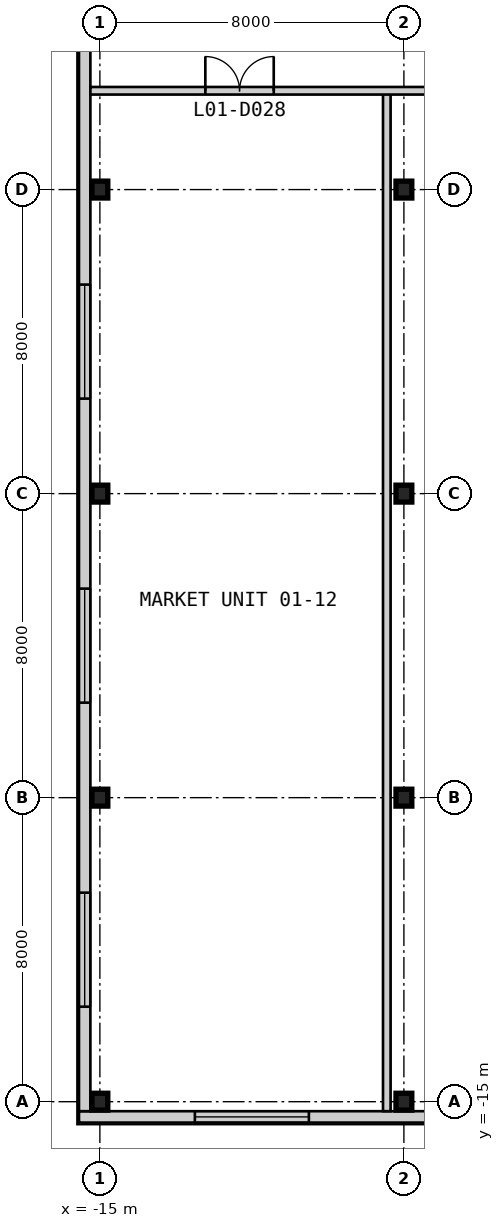
"""IFC4 building model, lengths in metres.
Left out: names, types, materials, properties, quantities, classifications, styles, units other than length and angle.
Written with IfcOpenShell. Run it as: python <this file> out.ifc"""

import sys

from ifc_helpers import new_model, si_unit, direction, frame, frame_2d, origin, origin_2d, place, context, subcontext, project, spatial, rectangle, i_section, extrude, element, fill, save


model = new_model("IFC4")
c1 = context("Model", 3, precision=1e-05, world=origin(), true_north=direction((0.0, 1.0)))
c2 = subcontext(c1, "Body", "Model", "MODEL_VIEW")
j1 = project(units=[si_unit("LENGTHUNIT", "METRE"), si_unit("PLANEANGLEUNIT", "RADIAN")], contexts=[c1])
p1 = place(None, origin())
s1 = spatial("IfcSite", under=j1, at=p1, CompositionType="ELEMENT")
p2 = place(p1, origin())
s2 = spatial("IfcBuilding", under=s1, at=p2, CompositionType="ELEMENT")
p3 = place(p2, frame((0.0, 0.0, 7.0)))
s3 = spatial("IfcBuildingStorey", under=s2, at=p3, CompositionType="ELEMENT", Elevation=7.0)
for number, where, z_axis, x_axis in (
    (1, (-15.0, -15.0, 0.0), (0.0, 0.0, 1.0), (1.0, 0.0, 0.0)),
    (2, (-15.0, -7.0, 0.0), (0.0, 0.0, 1.0), (1.0, 0.0, 0.0)),
    (3, (-15.0, 1.0, 0.0), (0.0, 0.0, 1.0), (1.0, 0.0, 0.0)),
    (4, (-15.0, 9.0, 0.0), (0.0, 0.0, 1.0), (1.0, 0.0, 0.0)),
    (5, (-7.0, -15.0, 0.0), (0.0, 0.0, 1.0), (1.0, 0.0, 0.0)),
    (6, (-7.0, -7.0, 0.0), (0.0, 0.0, 1.0), (1.0, 0.0, 0.0)),
    (7, (-7.0, 1.0, 0.0), (0.0, 0.0, 1.0), (1.0, 0.0, 0.0)),
    (8, (-7.0, 9.0, 0.0), (0.0, 0.0, 1.0), (1.0, 0.0, 0.0)),
):
    element("IfcColumn", number, at=place(p3, frame(where, z_axis=z_axis, x_axis=x_axis)), inside=s3, PredefinedType="COLUMN", context=c2, shape_type="SweptSolid", body=[
        extrude(i_section(OverallWidth=0.417, OverallDepth=0.445, WebThickness=0.039, FlangeThickness=0.063, at=origin_2d()), origin(), (0.0, 0.0, 1.0), 4.8),
    ])
p4 = place(p3, frame((-15.55, -15.4, 0.0), z_axis=(0.0, 0.0, 1.0), x_axis=(1.0, 0.0, 0.0)))
e9 = element("IfcWall", 9, at=p4, inside=s3, PredefinedType="SOLIDWALL", context=c2, shape_type="SweptSolid", body=[
    extrude(rectangle(XDim=81.1, YDim=0.3, at=frame_2d((40.55, 0.0))), origin(), (0.0, 0.0, 1.0), 4.5),
])
p5 = place(p4, frame((3.05, 0.0, 0.9)))
e10 = element("IfcOpeningElement", 10, at=p5, cuts=e9, PredefinedType="OPENING", context=c2, shape_type="SweptSolid", body=[
    extrude(rectangle(XDim=3.0, YDim=2.4, at=frame_2d((1.5, 1.2))), frame((0.0, 0.16, 0.0), z_axis=(0.0, -1.0, 0.0), x_axis=(1.0, 0.0, 0.0)), (0.0, 0.0, 1.0), 0.32),
])
p6 = place(p4, frame((11.05, 0.0, 0.9)))
e11 = element("IfcOpeningElement", 11, at=p6, cuts=e9, PredefinedType="OPENING", context=c2, shape_type="SweptSolid", body=[
    extrude(rectangle(XDim=3.0, YDim=2.4, at=frame_2d((1.5, 1.2))), frame((0.0, 0.16, 0.0), z_axis=(0.0, -1.0, 0.0), x_axis=(1.0, 0.0, 0.0)), (0.0, 0.0, 1.0), 0.32),
])
p7 = place(p4, frame((19.05, 0.0, 0.9)))
e12 = element("IfcOpeningElement", 12, at=p7, cuts=e9, PredefinedType="OPENING", context=c2, shape_type="SweptSolid", body=[
    extrude(rectangle(XDim=3.0, YDim=2.4, at=frame_2d((1.5, 1.2))), frame((0.0, 0.16, 0.0), z_axis=(0.0, -1.0, 0.0), x_axis=(1.0, 0.0, 0.0)), (0.0, 0.0, 1.0), 0.32),
])
p8 = place(p4, frame((33.05, 0.0, 0.9)))
e13 = element("IfcOpeningElement", 13, at=p8, cuts=e9, PredefinedType="OPENING", context=c2, shape_type="SweptSolid", body=[
    extrude(rectangle(XDim=3.0, YDim=2.4, at=frame_2d((1.5, 1.2))), frame((0.0, 0.16, 0.0), z_axis=(0.0, -1.0, 0.0), x_axis=(1.0, 0.0, 0.0)), (0.0, 0.0, 1.0), 0.32),
])
p9 = place(p4, frame((45.05, 0.0, 0.9)))
e14 = element("IfcOpeningElement", 14, at=p9, cuts=e9, PredefinedType="OPENING", context=c2, shape_type="SweptSolid", body=[
    extrude(rectangle(XDim=3.0, YDim=2.4, at=frame_2d((1.5, 1.2))), frame((0.0, 0.16, 0.0), z_axis=(0.0, -1.0, 0.0), x_axis=(1.0, 0.0, 0.0)), (0.0, 0.0, 1.0), 0.32),
])
p10 = place(p4, frame((53.55, 0.0, 0.9)))
e15 = element("IfcOpeningElement", 15, at=p10, cuts=e9, PredefinedType="OPENING", context=c2, shape_type="SweptSolid", body=[
    extrude(rectangle(XDim=3.0, YDim=2.4, at=frame_2d((1.5, 1.2))), frame((0.0, 0.16, 0.0), z_axis=(0.0, -1.0, 0.0), x_axis=(1.0, 0.0, 0.0)), (0.0, 0.0, 1.0), 0.32),
])
p11 = place(p4, frame((59.55, 0.0, 0.9)))
e16 = element("IfcOpeningElement", 16, at=p11, cuts=e9, PredefinedType="OPENING", context=c2, shape_type="SweptSolid", body=[
    extrude(rectangle(XDim=3.0, YDim=2.4, at=frame_2d((1.5, 1.2))), frame((0.0, 0.16, 0.0), z_axis=(0.0, -1.0, 0.0), x_axis=(1.0, 0.0, 0.0)), (0.0, 0.0, 1.0), 0.32),
])
p12 = place(p4, frame((67.05, 0.0, 0.9)))
e17 = element("IfcOpeningElement", 17, at=p12, cuts=e9, PredefinedType="OPENING", context=c2, shape_type="SweptSolid", body=[
    extrude(rectangle(XDim=3.0, YDim=2.4, at=frame_2d((1.5, 1.2))), frame((0.0, 0.16, 0.0), z_axis=(0.0, -1.0, 0.0), x_axis=(1.0, 0.0, 0.0)), (0.0, 0.0, 1.0), 0.32),
])
p13 = place(p4, frame((75.05, 0.0, 0.9)))
e18 = element("IfcOpeningElement", 18, at=p13, cuts=e9, PredefinedType="OPENING", context=c2, shape_type="SweptSolid", body=[
    extrude(rectangle(XDim=3.0, YDim=2.4, at=frame_2d((1.5, 1.2))), frame((0.0, 0.16, 0.0), z_axis=(0.0, -1.0, 0.0), x_axis=(1.0, 0.0, 0.0)), (0.0, 0.0, 1.0), 0.32),
])
p14 = place(p3, frame((-15.4, 65.25, 0.0), z_axis=(0.0, 0.0, 1.0), x_axis=(0.0, -1.0, 0.0)))
e19 = element("IfcWall", 19, at=p14, inside=s3, PredefinedType="SOLIDWALL", context=c2, shape_type="SweptSolid", body=[
    extrude(rectangle(XDim=80.5, YDim=0.3, at=frame_2d((40.25, 0.0))), origin(), (0.0, 0.0, 1.0), 4.5),
])
p15 = place(p14, frame((74.75, 0.0, 0.9)))
e20 = element("IfcOpeningElement", 20, at=p15, cuts=e19, PredefinedType="OPENING", context=c2, shape_type="SweptSolid", body=[
    extrude(rectangle(XDim=3.0, YDim=2.4, at=frame_2d((1.5, 1.2))), frame((0.0, 0.16, 0.0), z_axis=(0.0, -1.0, 0.0), x_axis=(1.0, 0.0, 0.0)), (0.0, 0.0, 1.0), 0.32),
])
p16 = place(p14, frame((66.75, 0.0, 0.9)))
e21 = element("IfcOpeningElement", 21, at=p16, cuts=e19, PredefinedType="OPENING", context=c2, shape_type="SweptSolid", body=[
    extrude(rectangle(XDim=3.0, YDim=2.4, at=frame_2d((1.5, 1.2))), frame((0.0, 0.16, 0.0), z_axis=(0.0, -1.0, 0.0), x_axis=(1.0, 0.0, 0.0)), (0.0, 0.0, 1.0), 0.32),
])
p17 = place(p14, frame((58.75, 0.0, 0.9)))
e22 = element("IfcOpeningElement", 22, at=p17, cuts=e19, PredefinedType="OPENING", context=c2, shape_type="SweptSolid", body=[
    extrude(rectangle(XDim=3.0, YDim=2.4, at=frame_2d((1.5, 1.2))), frame((0.0, 0.16, 0.0), z_axis=(0.0, -1.0, 0.0), x_axis=(1.0, 0.0, 0.0)), (0.0, 0.0, 1.0), 0.32),
])
p18 = place(p14, frame((44.75, 0.0, 0.9)))
e23 = element("IfcOpeningElement", 23, at=p18, cuts=e19, PredefinedType="OPENING", context=c2, shape_type="SweptSolid", body=[
    extrude(rectangle(XDim=3.0, YDim=2.4, at=frame_2d((1.5, 1.2))), frame((0.0, 0.16, 0.0), z_axis=(0.0, -1.0, 0.0), x_axis=(1.0, 0.0, 0.0)), (0.0, 0.0, 1.0), 0.32),
])
p19 = place(p14, frame((32.75, 0.0, 0.9)))
e24 = element("IfcOpeningElement", 24, at=p19, cuts=e19, PredefinedType="OPENING", context=c2, shape_type="SweptSolid", body=[
    extrude(rectangle(XDim=3.0, YDim=2.4, at=frame_2d((1.5, 1.2))), frame((0.0, 0.16, 0.0), z_axis=(0.0, -1.0, 0.0), x_axis=(1.0, 0.0, 0.0)), (0.0, 0.0, 1.0), 0.32),
])
p20 = place(p14, frame((24.25, 0.0, 0.9)))
e25 = element("IfcOpeningElement", 25, at=p20, cuts=e19, PredefinedType="OPENING", context=c2, shape_type="SweptSolid", body=[
    extrude(rectangle(XDim=3.0, YDim=2.4, at=frame_2d((1.5, 1.2))), frame((0.0, 0.16, 0.0), z_axis=(0.0, -1.0, 0.0), x_axis=(1.0, 0.0, 0.0)), (0.0, 0.0, 1.0), 0.32),
])
p21 = place(p14, frame((18.25, 0.0, 0.9)))
e26 = element("IfcOpeningElement", 26, at=p21, cuts=e19, PredefinedType="OPENING", context=c2, shape_type="SweptSolid", body=[
    extrude(rectangle(XDim=3.0, YDim=2.4, at=frame_2d((1.5, 1.2))), frame((0.0, 0.16, 0.0), z_axis=(0.0, -1.0, 0.0), x_axis=(1.0, 0.0, 0.0)), (0.0, 0.0, 1.0), 0.32),
])
p22 = place(p14, frame((10.75, 0.0, 0.9)))
e27 = element("IfcOpeningElement", 27, at=p22, cuts=e19, PredefinedType="OPENING", context=c2, shape_type="SweptSolid", body=[
    extrude(rectangle(XDim=3.0, YDim=2.4, at=frame_2d((1.5, 1.2))), frame((0.0, 0.16, 0.0), z_axis=(0.0, -1.0, 0.0), x_axis=(1.0, 0.0, 0.0)), (0.0, 0.0, 1.0), 0.32),
])
p23 = place(p14, frame((2.75, 0.0, 0.9)))
e28 = element("IfcOpeningElement", 28, at=p23, cuts=e19, PredefinedType="OPENING", context=c2, shape_type="SweptSolid", body=[
    extrude(rectangle(XDim=3.0, YDim=2.4, at=frame_2d((1.5, 1.2))), frame((0.0, 0.16, 0.0), z_axis=(0.0, -1.0, 0.0), x_axis=(1.0, 0.0, 0.0)), (0.0, 0.0, 1.0), 0.32),
])
p24 = place(p3, frame((-7.45, -15.25, 0.0), z_axis=(0.0, 0.0, 1.0), x_axis=(0.0, 1.0, 0.0)))
e29 = element("IfcWall", 29, at=p24, inside=s3, PredefinedType="PARTITIONING", context=c2, shape_type="SweptSolid", body=[
    extrude(rectangle(XDim=26.85, YDim=0.2, at=frame_2d((13.425, 0.0))), origin(), (0.0, 0.0, 1.0), 4.5),
])
p25 = place(p3, frame((-15.25, 11.6, 0.0), z_axis=(0.0, 0.0, 1.0), x_axis=(1.0, 0.0, 0.0)))
e30 = element("IfcWall", 30, at=p25, inside=s3, PredefinedType="PARTITIONING", context=c2, shape_type="SweptSolid", body=[
    extrude(rectangle(XDim=22.25, YDim=0.2, at=frame_2d((11.125, 0.0))), origin(), (0.0, 0.0, 1.0), 4.5),
])
p26 = place(p25, frame((10.325, 0.0, 0.0)))
e31 = element("IfcOpeningElement", 31, at=p26, cuts=e30, PredefinedType="OPENING", context=c2, shape_type="SweptSolid", body=[
    extrude(rectangle(XDim=1.8, YDim=2.4, at=frame_2d((0.9, 1.2))), frame((0.0, 0.11, 0.0), z_axis=(0.0, -1.0, 0.0), x_axis=(1.0, 0.0, 0.0)), (0.0, 0.0, 1.0), 0.22),
])
p27 = place(p25, frame((3.025, 0.0, 0.0)))
e32 = element("IfcOpeningElement", 32, at=p27, cuts=e30, PredefinedType="OPENING", context=c2, shape_type="SweptSolid", body=[
    extrude(rectangle(XDim=1.8, YDim=2.4, at=frame_2d((0.9, 1.2))), frame((0.0, 0.11, 0.0), z_axis=(0.0, -1.0, 0.0), x_axis=(1.0, 0.0, 0.0)), (0.0, 0.0, 1.0), 0.22),
])
p28 = place(p25, frame((17.975, 0.0, 0.0)))
e33 = element("IfcOpeningElement", 33, at=p28, cuts=e30, PredefinedType="OPENING", context=c2, shape_type="SweptSolid", body=[
    extrude(rectangle(XDim=0.9, YDim=2.2, at=frame_2d((0.45, 1.1))), frame((0.0, 0.11, 0.0), z_axis=(0.0, -1.0, 0.0), x_axis=(1.0, 0.0, 0.0)), (0.0, 0.0, 1.0), 0.22),
])
p29 = place(p5, origin())
e34 = element("IfcWindow", 34, at=p29, inside=s3, PartitioningType="SINGLE_PANEL", PredefinedType="WINDOW", context=c2, shape_type="SweptSolid", body=[
    extrude(rectangle(XDim=3.0, YDim=2.4, at=frame_2d((1.5, 1.2))), frame((0.0, 0.03, 0.0), z_axis=(0.0, -1.0, 0.0), x_axis=(1.0, 0.0, 0.0)), (0.0, 0.0, 1.0), 0.06),
])
fill(e10, e34)
p30 = place(p15, origin())
e35 = element("IfcWindow", 35, at=p30, inside=s3, PartitioningType="SINGLE_PANEL", PredefinedType="WINDOW", context=c2, shape_type="SweptSolid", body=[
    extrude(rectangle(XDim=3.0, YDim=2.4, at=frame_2d((1.5, 1.2))), frame((0.0, 0.03, 0.0), z_axis=(0.0, -1.0, 0.0), x_axis=(1.0, 0.0, 0.0)), (0.0, 0.0, 1.0), 0.06),
])
fill(e20, e35)
p31 = place(p16, origin())
e36 = element("IfcWindow", 36, at=p31, inside=s3, PartitioningType="SINGLE_PANEL", PredefinedType="WINDOW", context=c2, shape_type="SweptSolid", body=[
    extrude(rectangle(XDim=3.0, YDim=2.4, at=frame_2d((1.5, 1.2))), frame((0.0, 0.03, 0.0), z_axis=(0.0, -1.0, 0.0), x_axis=(1.0, 0.0, 0.0)), (0.0, 0.0, 1.0), 0.06),
])
fill(e21, e36)
p32 = place(p17, origin())
e37 = element("IfcWindow", 37, at=p32, inside=s3, PartitioningType="SINGLE_PANEL", PredefinedType="WINDOW", context=c2, shape_type="SweptSolid", body=[
    extrude(rectangle(XDim=3.0, YDim=2.4, at=frame_2d((1.5, 1.2))), frame((0.0, 0.03, 0.0), z_axis=(0.0, -1.0, 0.0), x_axis=(1.0, 0.0, 0.0)), (0.0, 0.0, 1.0), 0.06),
])
fill(e22, e37)
p33 = place(p27, origin())
e38 = element("IfcDoor", 38, at=p33, inside=s3, OperationType="DOUBLE_DOOR_SINGLE_SWING", PredefinedType="DOOR", context=c2, shape_type="SweptSolid", body=[
    extrude(rectangle(XDim=1.8, YDim=2.4, at=frame_2d((0.9, 1.2))), frame((0.0, 0.025, 0.0), z_axis=(0.0, -1.0, 0.0), x_axis=(1.0, 0.0, 0.0)), (0.0, 0.0, 1.0), 0.05),
])
fill(e32, e38)
save(model, sys.argv[1])
